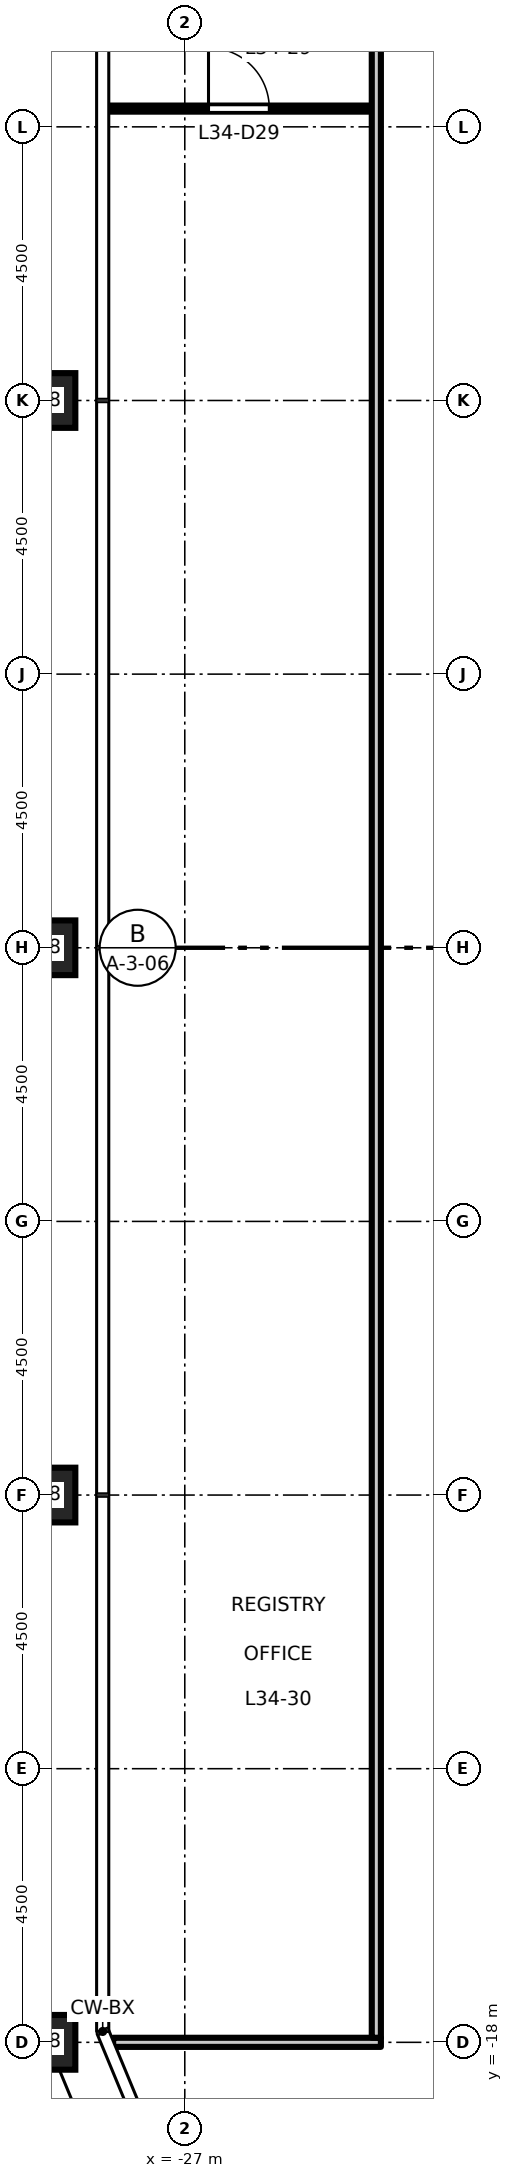
"""IFC4 building model, lengths in metres.
Left out: names, types, materials, properties, quantities, classifications, styles, units other than length and angle.
Written with IfcOpenShell. Run it as: python <this file> out.ifc"""

import sys

from ifc_helpers import new_model, si_unit, direction, frame, frame_2d, origin, origin_2d, place, context, subcontext, project, spatial, rectangle, hollow_rectangle, extrude, element, fill, save


model = new_model("IFC4")
c1 = context("Model", 3, precision=1e-05, world=origin(), true_north=direction((0.0, 1.0)))
c2 = subcontext(c1, "Body", "Model", "MODEL_VIEW")
j1 = project(units=[si_unit("LENGTHUNIT", "METRE"), si_unit("PLANEANGLEUNIT", "RADIAN")], contexts=[c1])
p1 = place(None, origin())
s1 = spatial("IfcSite", under=j1, at=p1, CompositionType="ELEMENT")
p2 = place(p1, origin())
s2 = spatial("IfcBuilding", under=s1, at=p2, CompositionType="ELEMENT")
p3 = place(p2, frame((0.0, 0.0, 158.7)))
s3 = spatial("IfcBuildingStorey", under=s2, at=p3, CompositionType="ELEMENT", Elevation=158.7)
for number, where, z_axis, x_axis in (
    (1, (-29.25, 9.0, 0.0), (0.0, 0.0, 1.0), (1.0, 0.0, 0.0)),
    (2, (-29.25, 0.0, 0.0), (0.0, 0.0, 1.0), (1.0, 0.0, 0.0)),
    (3, (-29.25, -9.0, 0.0), (0.0, 0.0, 1.0), (1.0, 0.0, 0.0)),
    (4, (-29.25, -18.0, 0.0), (0.0, 0.0, 1.0), (1.0, 0.0, 0.0)),
):
    element("IfcColumn", number, at=place(p3, frame(where, z_axis=z_axis, x_axis=x_axis)), inside=s3, PredefinedType="COLUMN", context=c2, shape_type="SweptSolid", body=[
        extrude(hollow_rectangle(XDim=0.9, YDim=0.9, WallThickness=0.05, at=origin_2d()), origin(), (0.0, 0.0, 1.0), 4.5),
    ])
p4 = place(p3, frame((-28.178, -18.0, 0.0), z_axis=(0.0, 0.0, 1.0), x_axis=(1.0, 0.0, 0.0)))
e5 = element("IfcWall", 5, at=p4, inside=s3, PredefinedType="PARTITIONING", context=c2, shape_type="SweptSolid", body=[
    extrude(rectangle(XDim=4.403, YDim=0.15, at=frame_2d((2.202, 0.0))), origin(), (0.0, 0.0, 1.0), 4.35),
])
p5 = place(p3, frame((-28.26, 13.8, 0.0), z_axis=(0.0, 0.0, 1.0), x_axis=(1.0, 0.0, 0.0)))
e6 = element("IfcWall", 6, at=p5, inside=s3, PredefinedType="PARTITIONING", context=c2, shape_type="SweptSolid", body=[
    extrude(rectangle(XDim=4.335, YDim=0.1, at=frame_2d((2.167, 0.0))), origin(), (0.0, 0.0, 1.0), 4.35),
])
p6 = place(p5, frame((1.65, 0.0, 0.0)))
e7 = element("IfcOpeningElement", 7, at=p6, cuts=e6, PredefinedType="OPENING", context=c2, shape_type="SweptSolid", body=[
    extrude(rectangle(XDim=1.0, YDim=2.1, at=frame_2d((0.5, 1.05))), frame((0.0, 0.06, 0.0), z_axis=(0.0, -1.0, 0.0), x_axis=(1.0, 0.0, 0.0)), (0.0, 0.0, 1.0), 0.12),
])
p7 = place(p3, frame((-23.85, -17.925, 0.0), z_axis=(0.0, 0.0, 1.0), x_axis=(0.0, 1.0, 0.0)))
e8 = element("IfcWall", 8, at=p7, inside=s3, PredefinedType="PARTITIONING", context=c2, shape_type="SweptSolid", body=[
    extrude(rectangle(XDim=35.85, YDim=0.15, at=frame_2d((17.925, 0.0))), origin(), (0.0, 0.0, 1.0), 4.35),
])
p8 = place(p6, origin())
e9 = element("IfcDoor", 9, at=p8, inside=s3, OperationType="SINGLE_SWING_LEFT", PredefinedType="DOOR", context=c2, shape_type="SweptSolid", body=[
    extrude(rectangle(XDim=1.0, YDim=2.1, at=frame_2d((0.5, 1.05))), frame((0.0, 0.025, 0.0), z_axis=(0.0, -1.0, 0.0), x_axis=(1.0, 0.0, 0.0)), (0.0, 0.0, 1.0), 0.05),
])
fill(e7, e9)
save(model, sys.argv[1])
